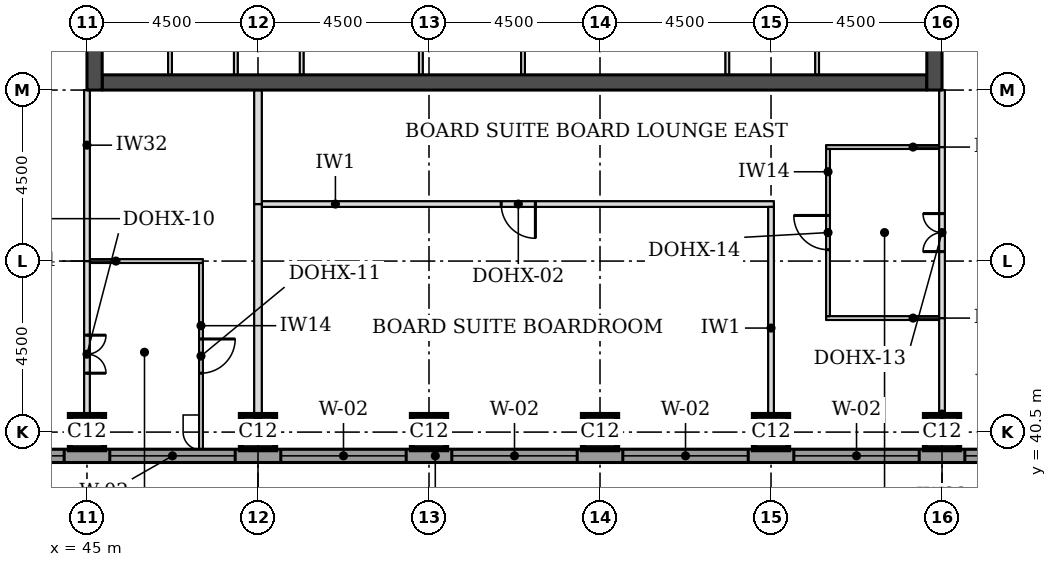
"""IFC4 building model, lengths in metres.
Left out: names, types, materials, properties, quantities, classifications, styles, units other than length and angle.
Written with IfcOpenShell. Run it as: python <this file> out.ifc"""

import sys

from ifc_helpers import new_model, si_unit, direction, frame, frame_2d, origin, origin_2d, place, context, subcontext, project, spatial, rectangle, extrude, element, fill, save


model = new_model("IFC4")
c1 = context("Model", 3, precision=1e-05, world=origin(), true_north=direction((0.0, 1.0)))
c2 = subcontext(c1, "Body", "Model", "MODEL_VIEW")
j1 = project(units=[si_unit("LENGTHUNIT", "METRE"), si_unit("PLANEANGLEUNIT", "RADIAN")], contexts=[c1])
p1 = place(None, origin())
s1 = spatial("IfcSite", under=j1, at=p1, CompositionType="ELEMENT")
p2 = place(p1, origin())
s2 = spatial("IfcBuilding", under=s1, at=p2, CompositionType="ELEMENT")
p3 = place(p2, frame((0.0, 0.0, 256.3)))
s3 = spatial("IfcBuildingStorey", under=s2, at=p3, CompositionType="ELEMENT", Elevation=256.3)
for number, where, z_axis, x_axis in (
    (1, (45.0, 40.5, 0.0), (0.0, 0.0, 1.0), (1.0, 0.0, 0.0)),
    (2, (49.5, 40.5, 0.0), (0.0, 0.0, 1.0), (1.0, 0.0, 0.0)),
    (3, (54.0, 40.5, 0.0), (0.0, 0.0, 1.0), (1.0, 0.0, 0.0)),
    (4, (58.5, 40.5, 0.0), (0.0, 0.0, 1.0), (1.0, 0.0, 0.0)),
    (5, (63.0, 40.5, 0.0), (0.0, 0.0, 1.0), (1.0, 0.0, 0.0)),
    (6, (67.5, 40.5, 0.0), (0.0, 0.0, 1.0), (1.0, 0.0, 0.0)),
):
    element("IfcColumn", number, at=place(p3, frame(where, z_axis=z_axis, x_axis=x_axis)), inside=s3, PredefinedType="COLUMN", context=c2, shape_type="SweptSolid", body=[
        extrude(rectangle(XDim=0.9, YDim=0.9, at=origin_2d()), origin(), (0.0, 0.0, 1.0), 3.7),
    ])
p4 = place(p3, frame((45.4, 49.7, 0.0), z_axis=(0.0, 0.0, 1.0), x_axis=(1.0, 0.0, 0.0)))
e7 = element("IfcWall", 7, at=p4, inside=s3, PredefinedType="SHEAR", context=c2, shape_type="SweptSolid", body=[
    extrude(rectangle(XDim=21.7, YDim=0.4, at=frame_2d((10.85, 0.0))), origin(), (0.0, 0.0, 1.0), 3.7),
])
p5 = place(p3, frame((45.2, 49.5, 0.0), z_axis=(0.0, 0.0, 1.0), x_axis=(0.0, 1.0, 0.0)))
e8 = element("IfcWall", 8, at=p5, inside=s3, PredefinedType="SHEAR", context=c2, shape_type="SweptSolid", body=[
    extrude(rectangle(XDim=22.5, YDim=0.4, at=frame_2d((11.25, 0.0))), origin(), (0.0, 0.0, 1.0), 3.7),
])
p6 = place(p5, frame((4.2, 0.0, 0.0)))
e9 = element("IfcOpeningElement", 9, at=p6, cuts=e8, PredefinedType="OPENING", context=c2, shape_type="SweptSolid", body=[
    extrude(rectangle(XDim=1.8, YDim=2.1, at=frame_2d((0.9, 1.05))), frame((0.0, 0.21, 0.0), z_axis=(0.0, -1.0, 0.0), x_axis=(1.0, 0.0, 0.0)), (0.0, 0.0, 1.0), 0.42),
])
p7 = place(p5, frame((6.9, 0.0, 0.0)))
e10 = element("IfcOpeningElement", 10, at=p7, cuts=e8, PredefinedType="OPENING", context=c2, shape_type="SweptSolid", body=[
    extrude(rectangle(XDim=1.1, YDim=2.1, at=frame_2d((0.55, 1.05))), frame((0.0, 0.21, 0.0), z_axis=(0.0, -1.0, 0.0), x_axis=(1.0, 0.0, 0.0)), (0.0, 0.0, 1.0), 0.42),
])
p8 = place(p5, frame((13.6, 0.0, 0.0)))
e11 = element("IfcOpeningElement", 11, at=p8, cuts=e8, PredefinedType="OPENING", context=c2, shape_type="SweptSolid", body=[
    extrude(rectangle(XDim=1.1, YDim=2.1, at=frame_2d((0.55, 1.05))), frame((0.0, 0.21, 0.0), z_axis=(0.0, -1.0, 0.0), x_axis=(1.0, 0.0, 0.0)), (0.0, 0.0, 1.0), 0.42),
])
p9 = place(p5, frame((16.5, 0.0, 0.0)))
e12 = element("IfcOpeningElement", 12, at=p9, cuts=e8, PredefinedType="OPENING", context=c2, shape_type="SweptSolid", body=[
    extrude(rectangle(XDim=1.8, YDim=2.1, at=frame_2d((0.9, 1.05))), frame((0.0, 0.21, 0.0), z_axis=(0.0, -1.0, 0.0), x_axis=(1.0, 0.0, 0.0)), (0.0, 0.0, 1.0), 0.42),
])
p10 = place(p3, frame((67.3, 49.5, 0.0), z_axis=(0.0, 0.0, 1.0), x_axis=(0.0, 1.0, 0.0)))
e13 = element("IfcWall", 13, at=p10, inside=s3, PredefinedType="SHEAR", context=c2, shape_type="SweptSolid", body=[
    extrude(rectangle(XDim=22.5, YDim=0.4, at=frame_2d((11.25, 0.0))), origin(), (0.0, 0.0, 1.0), 3.7),
])
p11 = place(p10, frame((4.2, 0.0, 0.0)))
e14 = element("IfcOpeningElement", 14, at=p11, cuts=e13, PredefinedType="OPENING", context=c2, shape_type="SweptSolid", body=[
    extrude(rectangle(XDim=1.8, YDim=2.1, at=frame_2d((0.9, 1.05))), frame((0.0, 0.21, 0.0), z_axis=(0.0, -1.0, 0.0), x_axis=(1.0, 0.0, 0.0)), (0.0, 0.0, 1.0), 0.42),
])
p12 = place(p10, frame((6.9, 0.0, 0.0)))
e15 = element("IfcOpeningElement", 15, at=p12, cuts=e13, PredefinedType="OPENING", context=c2, shape_type="SweptSolid", body=[
    extrude(rectangle(XDim=1.1, YDim=2.1, at=frame_2d((0.55, 1.05))), frame((0.0, 0.21, 0.0), z_axis=(0.0, -1.0, 0.0), x_axis=(1.0, 0.0, 0.0)), (0.0, 0.0, 1.0), 0.42),
])
p13 = place(p10, frame((13.6, 0.0, 0.0)))
e16 = element("IfcOpeningElement", 16, at=p13, cuts=e13, PredefinedType="OPENING", context=c2, shape_type="SweptSolid", body=[
    extrude(rectangle(XDim=1.1, YDim=2.1, at=frame_2d((0.55, 1.05))), frame((0.0, 0.21, 0.0), z_axis=(0.0, -1.0, 0.0), x_axis=(1.0, 0.0, 0.0)), (0.0, 0.0, 1.0), 0.42),
])
p14 = place(p10, frame((16.5, 0.0, 0.0)))
e17 = element("IfcOpeningElement", 17, at=p14, cuts=e13, PredefinedType="OPENING", context=c2, shape_type="SweptSolid", body=[
    extrude(rectangle(XDim=1.8, YDim=2.1, at=frame_2d((0.9, 1.05))), frame((0.0, 0.21, 0.0), z_axis=(0.0, -1.0, 0.0), x_axis=(1.0, 0.0, 0.0)), (0.0, 0.0, 1.0), 0.42),
])
p15 = place(p3, frame((36.0, 39.875, 0.0), z_axis=(0.0, 0.0, 1.0), x_axis=(1.0, 0.0, 0.0)))
e18 = element("IfcWall", 18, at=p15, inside=s3, PredefinedType="STANDARD", context=c2, shape_type="SweptSolid", body=[
    extrude(rectangle(XDim=36.331, YDim=0.35, at=frame_2d((18.166, 0.0))), origin(), (0.0, 0.0, 1.0), 3.525),
])
p16 = place(p15, frame((0.6, 0.0, 0.9)))
e19 = element("IfcOpeningElement", 19, at=p16, cuts=e18, PredefinedType="OPENING", context=c2, shape_type="SweptSolid", body=[
    extrude(rectangle(XDim=3.3, YDim=1.9, at=frame_2d((1.65, 0.95))), frame((0.0, 0.185, 0.0), z_axis=(0.0, -1.0, 0.0), x_axis=(1.0, 0.0, 0.0)), (0.0, 0.0, 1.0), 0.37),
])
p17 = place(p15, frame((5.1, 0.0, 0.9)))
e20 = element("IfcOpeningElement", 20, at=p17, cuts=e18, PredefinedType="OPENING", context=c2, shape_type="SweptSolid", body=[
    extrude(rectangle(XDim=3.3, YDim=1.9, at=frame_2d((1.65, 0.95))), frame((0.0, 0.185, 0.0), z_axis=(0.0, -1.0, 0.0), x_axis=(1.0, 0.0, 0.0)), (0.0, 0.0, 1.0), 0.37),
])
p18 = place(p15, frame((9.6, 0.0, 0.9)))
e21 = element("IfcOpeningElement", 21, at=p18, cuts=e18, PredefinedType="OPENING", context=c2, shape_type="SweptSolid", body=[
    extrude(rectangle(XDim=3.3, YDim=1.9, at=frame_2d((1.65, 0.95))), frame((0.0, 0.185, 0.0), z_axis=(0.0, -1.0, 0.0), x_axis=(1.0, 0.0, 0.0)), (0.0, 0.0, 1.0), 0.37),
])
p19 = place(p15, frame((14.1, 0.0, 0.9)))
e22 = element("IfcOpeningElement", 22, at=p19, cuts=e18, PredefinedType="OPENING", context=c2, shape_type="SweptSolid", body=[
    extrude(rectangle(XDim=3.3, YDim=1.9, at=frame_2d((1.65, 0.95))), frame((0.0, 0.185, 0.0), z_axis=(0.0, -1.0, 0.0), x_axis=(1.0, 0.0, 0.0)), (0.0, 0.0, 1.0), 0.37),
])
p20 = place(p15, frame((18.6, 0.0, 0.9)))
e23 = element("IfcOpeningElement", 23, at=p20, cuts=e18, PredefinedType="OPENING", context=c2, shape_type="SweptSolid", body=[
    extrude(rectangle(XDim=3.3, YDim=1.9, at=frame_2d((1.65, 0.95))), frame((0.0, 0.185, 0.0), z_axis=(0.0, -1.0, 0.0), x_axis=(1.0, 0.0, 0.0)), (0.0, 0.0, 1.0), 0.37),
])
p21 = place(p15, frame((23.1, 0.0, 0.9)))
e24 = element("IfcOpeningElement", 24, at=p21, cuts=e18, PredefinedType="OPENING", context=c2, shape_type="SweptSolid", body=[
    extrude(rectangle(XDim=3.3, YDim=1.9, at=frame_2d((1.65, 0.95))), frame((0.0, 0.185, 0.0), z_axis=(0.0, -1.0, 0.0), x_axis=(1.0, 0.0, 0.0)), (0.0, 0.0, 1.0), 0.37),
])
p22 = place(p15, frame((27.6, 0.0, 0.9)))
e25 = element("IfcOpeningElement", 25, at=p22, cuts=e18, PredefinedType="OPENING", context=c2, shape_type="SweptSolid", body=[
    extrude(rectangle(XDim=3.3, YDim=1.9, at=frame_2d((1.65, 0.95))), frame((0.0, 0.185, 0.0), z_axis=(0.0, -1.0, 0.0), x_axis=(1.0, 0.0, 0.0)), (0.0, 0.0, 1.0), 0.37),
])
p23 = place(p15, frame((32.1, 0.0, 0.9)))
e26 = element("IfcOpeningElement", 26, at=p23, cuts=e18, PredefinedType="OPENING", context=c2, shape_type="SweptSolid", body=[
    extrude(rectangle(XDim=3.3, YDim=1.9, at=frame_2d((1.65, 0.95))), frame((0.0, 0.185, 0.0), z_axis=(0.0, -1.0, 0.0), x_axis=(1.0, 0.0, 0.0)), (0.0, 0.0, 1.0), 0.37),
])
for number, where, z_axis, x_axis in (
    (27, (64.45, 43.5, 0.0), (0.0, 0.0, 1.0), (1.0, 0.0, 0.0)),
    (28, (45.075, 45.0, 0.0), (0.0, 0.0, 1.0), (1.0, 0.0, 0.0)),
):
    element("IfcWall", number, at=place(p3, frame(where, z_axis=z_axis, x_axis=x_axis)), inside=s3, PredefinedType="PARTITIONING", context=c2, shape_type="SweptSolid", body=[
        extrude(rectangle(XDim=2.975, YDim=0.1, at=frame_2d((1.488, 0.0))), origin(), (0.0, 0.0, 1.0), 3.55),
    ])
p24 = place(p3, frame((49.6, 46.5, 0.0), z_axis=(0.0, 0.0, 1.0), x_axis=(1.0, 0.0, 0.0)))
e29 = element("IfcWall", 29, at=p24, inside=s3, PredefinedType="PARTITIONING", context=c2, shape_type="SweptSolid", body=[
    extrude(rectangle(XDim=13.475, YDim=0.15, at=frame_2d((6.737, 0.0))), origin(), (0.0, 0.0, 1.0), 3.55),
])
p25 = place(p24, frame((6.3, 0.0, 0.0)))
e30 = element("IfcOpeningElement", 30, at=p25, cuts=e29, PredefinedType="OPENING", context=c2, shape_type="SweptSolid", body=[
    extrude(rectangle(XDim=0.9, YDim=2.1, at=frame_2d((0.45, 1.05))), frame((0.0, 0.085, 0.0), z_axis=(0.0, -1.0, 0.0), x_axis=(1.0, 0.0, 0.0)), (0.0, 0.0, 1.0), 0.17),
])
p26 = place(p3, frame((64.45, 48.0, 0.0), z_axis=(0.0, 0.0, 1.0), x_axis=(1.0, 0.0, 0.0)))
e31 = element("IfcWall", 31, at=p26, inside=s3, PredefinedType="PARTITIONING", context=c2, shape_type="SweptSolid", body=[
    extrude(rectangle(XDim=2.975, YDim=0.1, at=frame_2d((1.488, 0.0))), origin(), (0.0, 0.0, 1.0), 3.55),
])
p27 = place(p3, frame((45.0, 40.05, 0.0), z_axis=(0.0, 0.0, 1.0), x_axis=(0.0, 1.0, 0.0)))
e32 = element("IfcWall", 32, at=p27, inside=s3, PredefinedType="PARTITIONING", context=c2, shape_type="SweptSolid", body=[
    extrude(rectangle(XDim=4.95, YDim=0.15, at=frame_2d((2.475, 0.0))), origin(), (0.0, 0.0, 1.0), 3.022),
])
p28 = place(p27, frame((2.0, 0.0, 0.0)))
e33 = element("IfcOpeningElement", 33, at=p28, cuts=e32, PredefinedType="OPENING", context=c2, shape_type="SweptSolid", body=[
    extrude(rectangle(XDim=1.0, YDim=2.1, at=frame_2d((0.5, 1.05))), frame((0.0, 0.085, 0.0), z_axis=(0.0, -1.0, 0.0), x_axis=(1.0, 0.0, 0.0)), (0.0, 0.0, 1.0), 0.17),
])
p29 = place(p3, frame((48.0, 40.05, 0.0), z_axis=(0.0, 0.0, 1.0), x_axis=(0.0, 1.0, 0.0)))
e34 = element("IfcWall", 34, at=p29, inside=s3, PredefinedType="PARTITIONING", context=c2, shape_type="SweptSolid", body=[
    extrude(rectangle(XDim=4.9, YDim=0.1, at=frame_2d((2.45, 0.0))), origin(), (0.0, 0.0, 1.0), 3.55),
])
p30 = place(p29, frame((2.0, 0.0, 0.0)))
e35 = element("IfcOpeningElement", 35, at=p30, cuts=e34, PredefinedType="OPENING", context=c2, shape_type="SweptSolid", body=[
    extrude(rectangle(XDim=0.9, YDim=2.1, at=frame_2d((0.45, 1.05))), frame((0.0, 0.06, 0.0), z_axis=(0.0, -1.0, 0.0), x_axis=(1.0, 0.0, 0.0)), (0.0, 0.0, 1.0), 0.12),
])
p31 = place(p3, frame((49.5, 40.05, 0.0), z_axis=(0.0, 0.0, 1.0), x_axis=(0.0, 1.0, 0.0)))
e36 = element("IfcWall", 36, at=p31, inside=s3, PredefinedType="PARTITIONING", context=c2, shape_type="SweptSolid", body=[
    extrude(rectangle(XDim=6.45, YDim=0.2, at=frame_2d((3.225, 0.0))), origin(), (0.0, 0.0, 1.0), 3.55),
])
p32 = place(p3, frame((63.0, 40.05, 0.0), z_axis=(0.0, 0.0, 1.0), x_axis=(0.0, 1.0, 0.0)))
e37 = element("IfcWall", 37, at=p32, inside=s3, PredefinedType="PARTITIONING", context=c2, shape_type="SweptSolid", body=[
    extrude(rectangle(XDim=6.375, YDim=0.15, at=frame_2d((3.188, 0.0))), origin(), (0.0, 0.0, 1.0), 3.55),
])
p33 = place(p3, frame((67.5, 40.05, 0.0), z_axis=(0.0, 0.0, 1.0), x_axis=(0.0, 1.0, 0.0)))
e38 = element("IfcWall", 38, at=p33, inside=s3, PredefinedType="PARTITIONING", context=c2, shape_type="SweptSolid", body=[
    extrude(rectangle(XDim=3.45, YDim=0.15, at=frame_2d((1.725, 0.0))), origin(), (0.0, 0.0, 1.0), 3.022),
])
p34 = place(p3, frame((67.5, 43.5, 0.0), z_axis=(0.0, 0.0, 1.0), x_axis=(0.0, 1.0, 0.0)))
e39 = element("IfcWall", 39, at=p34, inside=s3, PredefinedType="PARTITIONING", context=c2, shape_type="SweptSolid", body=[
    extrude(rectangle(XDim=4.5, YDim=0.15, at=frame_2d((2.25, 0.0))), origin(), (0.0, 0.0, 1.0), 3.022),
])
p35 = place(p34, frame((1.75, 0.0, 0.0)))
e40 = element("IfcOpeningElement", 40, at=p35, cuts=e39, PredefinedType="OPENING", context=c2, shape_type="SweptSolid", body=[
    extrude(rectangle(XDim=1.0, YDim=2.1, at=frame_2d((0.5, 1.05))), frame((0.0, 0.085, 0.0), z_axis=(0.0, -1.0, 0.0), x_axis=(1.0, 0.0, 0.0)), (0.0, 0.0, 1.0), 0.17),
])
p36 = place(p3, frame((64.5, 43.55, 0.0), z_axis=(0.0, 0.0, 1.0), x_axis=(0.0, 1.0, 0.0)))
e41 = element("IfcWall", 41, at=p36, inside=s3, PredefinedType="PARTITIONING", context=c2, shape_type="SweptSolid", body=[
    extrude(rectangle(XDim=4.4, YDim=0.1, at=frame_2d((2.2, 0.0))), origin(), (0.0, 0.0, 1.0), 3.55),
])
p37 = place(p36, frame((1.75, 0.0, 0.0)))
e42 = element("IfcOpeningElement", 42, at=p37, cuts=e41, PredefinedType="OPENING", context=c2, shape_type="SweptSolid", body=[
    extrude(rectangle(XDim=0.9, YDim=2.1, at=frame_2d((0.45, 1.05))), frame((0.0, 0.06, 0.0), z_axis=(0.0, -1.0, 0.0), x_axis=(1.0, 0.0, 0.0)), (0.0, 0.0, 1.0), 0.12),
])
p38 = place(p3, frame((45.0, 45.0, 0.0), z_axis=(0.0, 0.0, 1.0), x_axis=(0.0, 1.0, 0.0)))
e43 = element("IfcWall", 43, at=p38, inside=s3, PredefinedType="PARTITIONING", context=c2, shape_type="SweptSolid", body=[
    extrude(rectangle(XDim=4.5, YDim=0.15, at=frame_2d((2.25, 0.0))), origin(), (0.0, 0.0, 1.0), 3.022),
])
p39 = place(p3, frame((49.5, 46.5, 0.0), z_axis=(0.0, 0.0, 1.0), x_axis=(0.0, 1.0, 0.0)))
e44 = element("IfcWall", 44, at=p39, inside=s3, PredefinedType="PARTITIONING", context=c2, shape_type="SweptSolid", body=[
    extrude(rectangle(XDim=3.0, YDim=0.2, at=frame_2d((1.5, 0.0))), origin(), (0.0, 0.0, 1.0), 3.55),
])
p40 = place(p3, frame((67.5, 48.0, 0.0), z_axis=(0.0, 0.0, 1.0), x_axis=(0.0, 1.0, 0.0)))
e45 = element("IfcWall", 45, at=p40, inside=s3, PredefinedType="PARTITIONING", context=c2, shape_type="SweptSolid", body=[
    extrude(rectangle(XDim=1.5, YDim=0.15, at=frame_2d((0.75, 0.0))), origin(), (0.0, 0.0, 1.0), 3.022),
])
for number, where, z_axis, x_axis in (
    (46, (47.185, 49.9, 0.0), (0.0, 0.0, 1.0), (0.0, 1.0, 0.0)),
    (47, (48.917, 49.9, 0.0), (0.0, 0.0, 1.0), (0.0, 1.0, 0.0)),
    (48, (50.65, 49.9, 0.0), (0.0, 0.0, 1.0), (0.0, 1.0, 0.0)),
    (49, (53.786, 49.9, 0.0), (0.0, 0.0, 1.0), (0.0, 1.0, 0.0)),
    (50, (56.474, 49.9, 0.0), (0.0, 0.0, 1.0), (0.0, 1.0, 0.0)),
    (51, (61.85, 49.9, 0.0), (0.0, 0.0, 1.0), (0.0, 1.0, 0.0)),
    (52, (64.212, 49.9, 0.0), (0.0, 0.0, 1.0), (0.0, 1.0, 0.0)),
):
    element("IfcWall", number, at=place(p3, frame(where, z_axis=z_axis, x_axis=x_axis)), inside=s3, PredefinedType="PARTITIONING", context=c2, shape_type="SweptSolid", body=[
        extrude(rectangle(XDim=3.1, YDim=0.1, at=frame_2d((1.55, 0.0))), origin(), (0.0, 0.0, 1.0), 3.55),
    ])
p41 = place(p17, origin())
e53 = element("IfcWindow", 53, at=p41, inside=s3, PartitioningType="SINGLE_PANEL", PredefinedType="WINDOW", context=c2, shape_type="SweptSolid", body=[
    extrude(rectangle(XDim=3.3, YDim=1.9, at=frame_2d((1.65, 0.95))), frame((0.0, 0.085, 0.0), z_axis=(0.0, -1.0, 0.0), x_axis=(1.0, 0.0, 0.0)), (0.0, 0.0, 1.0), 0.06),
])
fill(e20, e53)
p42 = place(p18, origin())
e54 = element("IfcWindow", 54, at=p42, inside=s3, PartitioningType="SINGLE_PANEL", PredefinedType="WINDOW", context=c2, shape_type="SweptSolid", body=[
    extrude(rectangle(XDim=3.3, YDim=1.9, at=frame_2d((1.65, 0.95))), frame((0.0, 0.085, 0.0), z_axis=(0.0, -1.0, 0.0), x_axis=(1.0, 0.0, 0.0)), (0.0, 0.0, 1.0), 0.06),
])
fill(e21, e54)
p43 = place(p19, origin())
e55 = element("IfcWindow", 55, at=p43, inside=s3, PartitioningType="SINGLE_PANEL", PredefinedType="WINDOW", context=c2, shape_type="SweptSolid", body=[
    extrude(rectangle(XDim=3.3, YDim=1.9, at=frame_2d((1.65, 0.95))), frame((0.0, 0.085, 0.0), z_axis=(0.0, -1.0, 0.0), x_axis=(1.0, 0.0, 0.0)), (0.0, 0.0, 1.0), 0.06),
])
fill(e22, e55)
p44 = place(p20, origin())
e56 = element("IfcWindow", 56, at=p44, inside=s3, PartitioningType="SINGLE_PANEL", PredefinedType="WINDOW", context=c2, shape_type="SweptSolid", body=[
    extrude(rectangle(XDim=3.3, YDim=1.9, at=frame_2d((1.65, 0.95))), frame((0.0, 0.085, 0.0), z_axis=(0.0, -1.0, 0.0), x_axis=(1.0, 0.0, 0.0)), (0.0, 0.0, 1.0), 0.06),
])
fill(e23, e56)
p45 = place(p21, origin())
e57 = element("IfcWindow", 57, at=p45, inside=s3, PartitioningType="SINGLE_PANEL", PredefinedType="WINDOW", context=c2, shape_type="SweptSolid", body=[
    extrude(rectangle(XDim=3.3, YDim=1.9, at=frame_2d((1.65, 0.95))), frame((0.0, 0.085, 0.0), z_axis=(0.0, -1.0, 0.0), x_axis=(1.0, 0.0, 0.0)), (0.0, 0.0, 1.0), 0.06),
])
fill(e24, e57)
p46 = place(p22, origin())
e58 = element("IfcWindow", 58, at=p46, inside=s3, PartitioningType="SINGLE_PANEL", PredefinedType="WINDOW", context=c2, shape_type="SweptSolid", body=[
    extrude(rectangle(XDim=3.3, YDim=1.9, at=frame_2d((1.65, 0.95))), frame((0.0, 0.085, 0.0), z_axis=(0.0, -1.0, 0.0), x_axis=(1.0, 0.0, 0.0)), (0.0, 0.0, 1.0), 0.06),
])
fill(e25, e58)
p47 = place(p23, origin())
e59 = element("IfcWindow", 59, at=p47, inside=s3, PartitioningType="SINGLE_PANEL", PredefinedType="WINDOW", context=c2, shape_type="SweptSolid", body=[
    extrude(rectangle(XDim=3.3, YDim=1.9, at=frame_2d((1.65, 0.95))), frame((0.0, 0.085, 0.0), z_axis=(0.0, -1.0, 0.0), x_axis=(1.0, 0.0, 0.0)), (0.0, 0.0, 1.0), 0.06),
])
fill(e26, e59)
p48 = place(p28, frame((1.0, 0.0, 0.0), z_axis=(0.0, 0.0, 1.0), x_axis=(-1.0, 0.0, 0.0)))
e60 = element("IfcDoor", 60, at=p48, inside=s3, OperationType="DOUBLE_DOOR_SINGLE_SWING", PredefinedType="DOOR", context=c2, shape_type="SweptSolid", body=[
    extrude(rectangle(XDim=1.0, YDim=2.1, at=frame_2d((0.5, 1.05))), frame((0.0, 0.025, 0.0), z_axis=(0.0, -1.0, 0.0), x_axis=(1.0, 0.0, 0.0)), (0.0, 0.0, 1.0), 0.05),
])
fill(e33, e60)
p49 = place(p30, frame((0.9, 0.0, 0.0), z_axis=(0.0, 0.0, 1.0), x_axis=(-1.0, 0.0, 0.0)))
e61 = element("IfcDoor", 61, at=p49, inside=s3, OperationType="SINGLE_SWING_LEFT", PredefinedType="DOOR", context=c2, shape_type="SweptSolid", body=[
    extrude(rectangle(XDim=0.9, YDim=2.1, at=frame_2d((0.45, 1.05))), frame((0.0, 0.025, 0.0), z_axis=(0.0, -1.0, 0.0), x_axis=(1.0, 0.0, 0.0)), (0.0, 0.0, 1.0), 0.05),
])
fill(e35, e61)
p50 = place(p35, origin())
e62 = element("IfcDoor", 62, at=p50, inside=s3, OperationType="DOUBLE_DOOR_SINGLE_SWING", PredefinedType="DOOR", context=c2, shape_type="SweptSolid", body=[
    extrude(rectangle(XDim=1.0, YDim=2.1, at=frame_2d((0.5, 1.05))), frame((0.0, 0.025, 0.0), z_axis=(0.0, -1.0, 0.0), x_axis=(1.0, 0.0, 0.0)), (0.0, 0.0, 1.0), 0.05),
])
fill(e40, e62)
p51 = place(p37, origin())
e63 = element("IfcDoor", 63, at=p51, inside=s3, OperationType="SINGLE_SWING_RIGHT", PredefinedType="DOOR", context=c2, shape_type="SweptSolid", body=[
    extrude(rectangle(XDim=0.9, YDim=2.1, at=frame_2d((0.45, 1.05))), frame((0.0, 0.025, 0.0), z_axis=(0.0, -1.0, 0.0), x_axis=(1.0, 0.0, 0.0)), (0.0, 0.0, 1.0), 0.05),
])
fill(e42, e63)
p52 = place(p25, frame((0.9, 0.0, 0.0), z_axis=(0.0, 0.0, 1.0), x_axis=(-1.0, 0.0, 0.0)))
e64 = element("IfcDoor", 64, at=p52, inside=s3, OperationType="SINGLE_SWING_LEFT", PredefinedType="DOOR", context=c2, shape_type="SweptSolid", body=[
    extrude(rectangle(XDim=0.9, YDim=2.1, at=frame_2d((0.45, 1.05))), frame((0.0, 0.025, 0.0), z_axis=(0.0, -1.0, 0.0), x_axis=(1.0, 0.0, 0.0)), (0.0, 0.0, 1.0), 0.05),
])
fill(e30, e64)
save(model, sys.argv[1])
